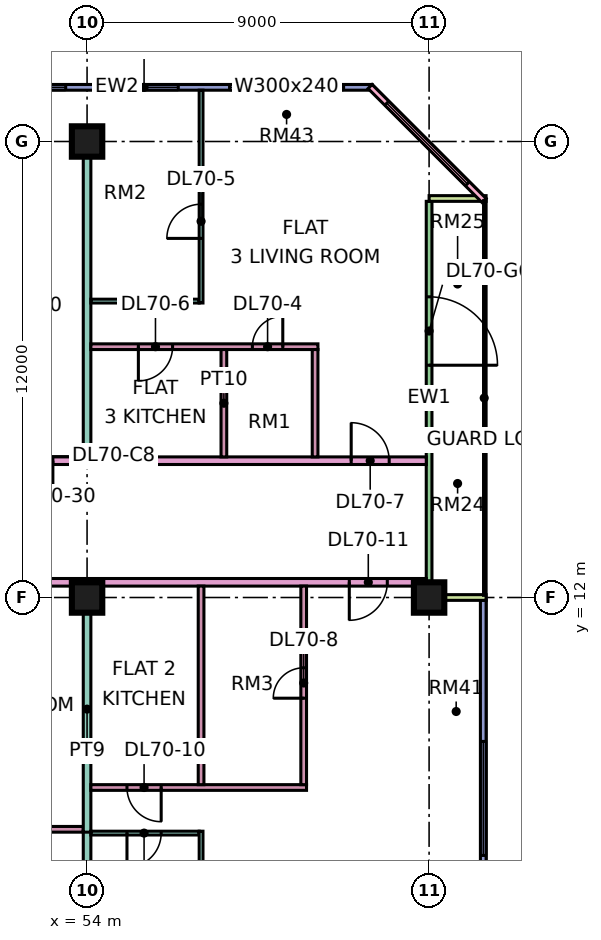
"""IFC4 building model, lengths in metres.
Left out: names, types, materials, properties, quantities, classifications, styles, units other than length and angle.
Written with IfcOpenShell. Run it as: python <this file> out.ifc"""

import sys

from ifc_helpers import new_model, si_unit, direction, frame, frame_2d, origin, origin_2d, place, context, subcontext, project, spatial, rectangle, extrude, element, fill, save


model = new_model("IFC4")
c1 = context("Model", 3, precision=1e-05, world=origin(), true_north=direction((0.0, 1.0)))
c2 = subcontext(c1, "Body", "Model", "MODEL_VIEW")
j1 = project(units=[si_unit("LENGTHUNIT", "METRE"), si_unit("PLANEANGLEUNIT", "RADIAN")], contexts=[c1])
p1 = place(None, origin())
s1 = spatial("IfcSite", under=j1, at=p1, CompositionType="ELEMENT")
p2 = place(p1, origin())
s2 = spatial("IfcBuilding", under=s1, at=p2, CompositionType="ELEMENT")
p3 = place(p2, frame((0.0, 0.0, 299.65)))
s3 = spatial("IfcBuildingStorey", under=s2, at=p3, CompositionType="ELEMENT", Elevation=299.65)
for number, where, z_axis, x_axis in (
    (1, (54.0, 12.0, 0.0), (0.0, 0.0, 1.0), (1.0, 0.0, 0.0)),
    (2, (54.0, 24.0, 0.0), (0.0, 0.0, 1.0), (1.0, 0.0, 0.0)),
    (3, (63.0, 12.0, 0.0), (0.0, 0.0, 1.0), (1.0, 0.0, 0.0)),
):
    element("IfcColumn", number, at=place(p3, frame(where, z_axis=z_axis, x_axis=x_axis)), inside=s3, PredefinedType="COLUMN", context=c2, shape_type="SweptSolid", body=[
        extrude(rectangle(XDim=0.8, YDim=0.8, at=origin_2d()), origin(), (0.0, 0.0, 1.0), 3.75),
    ])
p4 = place(p3, frame((61.5, 25.425, 0.0), z_axis=(0.0, 0.0, 1.0), x_axis=(-1.0, 0.0, 0.0)))
e4 = element("IfcWall", 4, at=p4, inside=s3, PredefinedType="SOLIDWALL", context=c2, shape_type="SweptSolid", body=[
    extrude(rectangle(XDim=13.425, YDim=0.15, at=frame_2d((6.712, 0.0))), origin(), (0.0, 0.0, 1.0), 3.35),
])
p5 = place(p4, frame((0.75, 0.0, 0.45)))
e5 = element("IfcOpeningElement", 5, at=p5, cuts=e4, PredefinedType="OPENING", context=c2, shape_type="SweptSolid", body=[
    extrude(rectangle(XDim=3.0, YDim=2.4, at=frame_2d((1.5, 1.2))), frame((0.0, 0.085, 0.0), z_axis=(0.0, -1.0, 0.0), x_axis=(1.0, 0.0, 0.0)), (0.0, 0.0, 1.0), 0.17),
])
p6 = place(p4, frame((5.1, 0.0, 0.45)))
e6 = element("IfcOpeningElement", 6, at=p6, cuts=e4, PredefinedType="OPENING", context=c2, shape_type="SweptSolid", body=[
    extrude(rectangle(XDim=1.8, YDim=2.4, at=frame_2d((0.9, 1.2))), frame((0.0, 0.085, 0.0), z_axis=(0.0, -1.0, 0.0), x_axis=(1.0, 0.0, 0.0)), (0.0, 0.0, 1.0), 0.17),
])
p7 = place(p4, frame((8.062, 0.0, 0.45)))
e7 = element("IfcOpeningElement", 7, at=p7, cuts=e4, PredefinedType="OPENING", context=c2, shape_type="SweptSolid", body=[
    extrude(rectangle(XDim=4.8, YDim=2.4, at=frame_2d((2.4, 1.2))), frame((0.0, 0.085, 0.0), z_axis=(0.0, -1.0, 0.0), x_axis=(1.0, 0.0, 0.0)), (0.0, 0.0, 1.0), 0.17),
])
p8 = place(p3, frame((64.425, 1.5, 0.0), z_axis=(0.0, 0.0, 1.0), x_axis=(0.0, 1.0, 0.0)))
e8 = element("IfcWall", 8, at=p8, inside=s3, PredefinedType="SOLIDWALL", context=c2, shape_type="SweptSolid", body=[
    extrude(rectangle(XDim=10.425, YDim=0.15, at=frame_2d((5.212, 0.0))), origin(), (0.0, 0.0, 1.0), 3.35),
])
p9 = place(p8, frame((3.712, 0.0, 0.45)))
e9 = element("IfcOpeningElement", 9, at=p9, cuts=e8, PredefinedType="OPENING", context=c2, shape_type="SweptSolid", body=[
    extrude(rectangle(XDim=3.0, YDim=2.4, at=frame_2d((1.5, 1.2))), frame((0.0, 0.085, 0.0), z_axis=(0.0, -1.0, 0.0), x_axis=(1.0, 0.0, 0.0)), (0.0, 0.0, 1.0), 0.17),
])
p10 = place(p3, frame((63.0, 12.075, 0.0), z_axis=(0.0, 0.0, 1.0), x_axis=(0.0, 1.0, 0.0)))
e10 = element("IfcWall", 10, at=p10, inside=s3, PredefinedType="SOLIDWALL", context=c2, shape_type="SweptSolid", body=[
    extrude(rectangle(XDim=10.35, YDim=0.15, at=frame_2d((5.175, 0.0))), origin(), (0.0, 0.0, 1.0), 3.35),
])
p11 = place(p10, frame((6.038, 0.0, 0.0)))
e11 = element("IfcOpeningElement", 11, at=p11, cuts=e10, PredefinedType="OPENING", context=c2, shape_type="SweptSolid", body=[
    extrude(rectangle(XDim=1.8, YDim=2.4, at=frame_2d((0.9, 1.2))), frame((0.0, 0.085, 0.0), z_axis=(0.0, -1.0, 0.0), x_axis=(1.0, 0.0, 0.0)), (0.0, 0.0, 1.0), 0.17),
])
for number, where, z_axis, x_axis in (
    (12, (64.5, 12.0, 0.0), (0.0, 0.0, 1.0), (-1.0, 0.0, 0.0)),
    (13, (64.5, 22.5, 0.0), (0.0, 0.0, 1.0), (-1.0, 0.0, 0.0)),
):
    element("IfcWall", number, at=place(p3, frame(where, z_axis=z_axis, x_axis=x_axis)), inside=s3, PredefinedType="SOLIDWALL", context=c2, shape_type="SweptSolid", body=[
        extrude(rectangle(XDim=1.5, YDim=0.15, at=frame_2d((0.75, 0.0))), origin(), (0.0, 0.0, 1.0), 3.35),
    ])
p12 = place(p3, frame((64.447, 22.447, 0.0), z_axis=(0.0, 0.0, 1.0), x_axis=(-0.707106781187, 0.707106781187, 0.0)))
e14 = element("IfcWall", 14, at=p12, inside=s3, PredefinedType="SOLIDWALL", context=c2, shape_type="SweptSolid", body=[
    extrude(rectangle(XDim=4.243, YDim=0.15, at=frame_2d((2.121, 0.0))), origin(), (0.0, 0.0, 1.0), 3.35),
])
p13 = place(p12, frame((0.621, 0.0, 0.45)))
e15 = element("IfcOpeningElement", 15, at=p13, cuts=e14, PredefinedType="OPENING", context=c2, shape_type="SweptSolid", body=[
    extrude(rectangle(XDim=3.0, YDim=2.4, at=frame_2d((1.5, 1.2))), frame((0.0, 0.085, 0.0), z_axis=(0.0, -1.0, 0.0), x_axis=(1.0, 0.0, 0.0)), (0.0, 0.0, 1.0), 0.17),
])
p14 = place(p3, frame((40.65, 12.4, 0.0), z_axis=(0.0, 0.0, 1.0), x_axis=(1.0, 0.0, 0.0)))
e16 = element("IfcWall", 16, at=p14, inside=s3, PredefinedType="PARTITIONING", context=c2, shape_type="SweptSolid", body=[
    extrude(rectangle(XDim=22.276, YDim=0.2, at=frame_2d((11.138, 0.0))), origin(), (0.0, 0.0, 1.0), 3.35),
])
p15 = place(p14, frame((20.25, 0.0, 0.0)))
e17 = element("IfcOpeningElement", 17, at=p15, cuts=e16, PredefinedType="OPENING", context=c2, shape_type="SweptSolid", body=[
    extrude(rectangle(XDim=1.0, YDim=2.1, at=frame_2d((0.5, 1.05))), frame((0.0, 0.11, 0.0), z_axis=(0.0, -1.0, 0.0), x_axis=(1.0, 0.0, 0.0)), (0.0, 0.0, 1.0), 0.22),
])
p16 = place(p14, frame((1.05, 0.0, 0.0)))
e18 = element("IfcOpeningElement", 18, at=p16, cuts=e16, PredefinedType="OPENING", context=c2, shape_type="SweptSolid", body=[
    extrude(rectangle(XDim=1.0, YDim=2.1, at=frame_2d((0.5, 1.05))), frame((0.0, 0.11, 0.0), z_axis=(0.0, -1.0, 0.0), x_axis=(1.0, 0.0, 0.0)), (0.0, 0.0, 1.0), 0.22),
])
p17 = place(p3, frame((43.575, 5.9, 0.0), z_axis=(0.0, 0.0, 1.0), x_axis=(1.0, 0.0, 0.0)))
e19 = element("IfcWall", 19, at=p17, inside=s3, PredefinedType="PARTITIONING", context=c2, shape_type="SweptSolid", body=[
    extrude(rectangle(XDim=10.325, YDim=0.15, at=frame_2d((5.163, 0.0))), origin(), (0.0, 0.0, 1.0), 3.35),
])
p18 = place(p17, frame((1.825, 0.0, 0.0)))
e20 = element("IfcOpeningElement", 20, at=p18, cuts=e19, PredefinedType="OPENING", context=c2, shape_type="SweptSolid", body=[
    extrude(rectangle(XDim=0.8, YDim=2.1, at=frame_2d((0.4, 1.05))), frame((0.0, 0.085, 0.0), z_axis=(0.0, -1.0, 0.0), x_axis=(1.0, 0.0, 0.0)), (0.0, 0.0, 1.0), 0.17),
])
p19 = place(p17, frame((6.975, 0.0, 0.0)))
e21 = element("IfcOpeningElement", 21, at=p19, cuts=e19, PredefinedType="OPENING", context=c2, shape_type="SweptSolid", body=[
    extrude(rectangle(XDim=0.9, YDim=2.1, at=frame_2d((0.45, 1.05))), frame((0.0, 0.085, 0.0), z_axis=(0.0, -1.0, 0.0), x_axis=(1.0, 0.0, 0.0)), (0.0, 0.0, 1.0), 0.17),
])
p20 = place(p3, frame((51.225, 15.6, 0.0), z_axis=(0.0, 0.0, 1.0), x_axis=(1.0, 0.0, 0.0)))
e22 = element("IfcWall", 22, at=p20, inside=s3, PredefinedType="PARTITIONING", context=c2, shape_type="SweptSolid", body=[
    extrude(rectangle(XDim=11.701, YDim=0.2, at=frame_2d((5.851, 0.0))), origin(), (0.0, 0.0, 1.0), 3.35),
])
p21 = place(p20, frame((9.725, 0.0, 0.0)))
e23 = element("IfcOpeningElement", 23, at=p21, cuts=e22, PredefinedType="OPENING", context=c2, shape_type="SweptSolid", body=[
    extrude(rectangle(XDim=1.0, YDim=2.1, at=frame_2d((0.5, 1.05))), frame((0.0, 0.11, 0.0), z_axis=(0.0, -1.0, 0.0), x_axis=(1.0, 0.0, 0.0)), (0.0, 0.0, 1.0), 0.22),
])
p22 = place(p20, frame((0.875, 0.0, 0.0)))
e24 = element("IfcOpeningElement", 24, at=p22, cuts=e22, PredefinedType="OPENING", context=c2, shape_type="SweptSolid", body=[
    extrude(rectangle(XDim=1.0, YDim=2.1, at=frame_2d((0.5, 1.05))), frame((0.0, 0.11, 0.0), z_axis=(0.0, -1.0, 0.0), x_axis=(1.0, 0.0, 0.0)), (0.0, 0.0, 1.0), 0.22),
])
p23 = place(p3, frame((54.0, 0.0, 0.0), z_axis=(0.0, 0.0, 1.0), x_axis=(0.0, 1.0, 0.0)))
e25 = element("IfcWall", 25, at=p23, inside=s3, PredefinedType="PARTITIONING", context=c2, shape_type="SweptSolid", body=[
    extrude(rectangle(XDim=5.85, YDim=0.2, at=frame_2d((2.925, 0.0))), origin(), (0.0, 0.0, 1.0), 3.35),
])
p24 = place(p3, frame((54.0, 5.825, 0.0), z_axis=(0.0, 0.0, 1.0), x_axis=(0.0, 1.0, 0.0)))
e26 = element("IfcWall", 26, at=p24, inside=s3, PredefinedType="PARTITIONING", context=c2, shape_type="SweptSolid", body=[
    extrude(rectangle(XDim=6.475, YDim=0.2, at=frame_2d((3.238, 0.0))), origin(), (0.0, 0.0, 1.0), 3.35),
])
p25 = place(p3, frame((54.0, 15.7, 0.0), z_axis=(0.0, 0.0, 1.0), x_axis=(0.0, 1.0, 0.0)))
e27 = element("IfcWall", 27, at=p25, inside=s3, PredefinedType="PARTITIONING", context=c2, shape_type="SweptSolid", body=[
    extrude(rectangle(XDim=8.3, YDim=0.2, at=frame_2d((4.15, 0.0))), origin(), (0.0, 0.0, 1.0), 3.35),
])
p26 = place(p3, frame((54.1, 5.8, 0.0), z_axis=(0.0, 0.0, 1.0), x_axis=(1.0, 0.0, 0.0)))
e28 = element("IfcWall", 28, at=p26, inside=s3, PredefinedType="PARTITIONING", context=c2, shape_type="SweptSolid", body=[
    extrude(rectangle(XDim=2.85, YDim=0.1, at=frame_2d((1.425, 0.0))), origin(), (0.0, 0.0, 1.0), 3.35),
])
p27 = place(p26, frame((0.95, 0.0, 0.0)))
e29 = element("IfcOpeningElement", 29, at=p27, cuts=e28, PredefinedType="OPENING", context=c2, shape_type="SweptSolid", body=[
    extrude(rectangle(XDim=0.9, YDim=2.1, at=frame_2d((0.45, 1.05))), frame((0.0, 0.06, 0.0), z_axis=(0.0, -1.0, 0.0), x_axis=(1.0, 0.0, 0.0)), (0.0, 0.0, 1.0), 0.12),
])
p28 = place(p3, frame((54.1, 7.0, 0.0), z_axis=(0.0, 0.0, 1.0), x_axis=(1.0, 0.0, 0.0)))
e30 = element("IfcWall", 30, at=p28, inside=s3, PredefinedType="PARTITIONING", context=c2, shape_type="SweptSolid", body=[
    extrude(rectangle(XDim=5.675, YDim=0.15, at=frame_2d((2.837, 0.0))), origin(), (0.0, 0.0, 1.0), 3.35),
])
p29 = place(p28, frame((0.95, 0.0, 0.0)))
e31 = element("IfcOpeningElement", 31, at=p29, cuts=e30, PredefinedType="OPENING", context=c2, shape_type="SweptSolid", body=[
    extrude(rectangle(XDim=0.9, YDim=2.1, at=frame_2d((0.45, 1.05))), frame((0.0, 0.085, 0.0), z_axis=(0.0, -1.0, 0.0), x_axis=(1.0, 0.0, 0.0)), (0.0, 0.0, 1.0), 0.17),
])
p30 = place(p3, frame((54.1, 18.6, 0.0), z_axis=(0.0, 0.0, 1.0), x_axis=(1.0, 0.0, 0.0)))
e32 = element("IfcWall", 32, at=p30, inside=s3, PredefinedType="PARTITIONING", context=c2, shape_type="SweptSolid", body=[
    extrude(rectangle(XDim=5.975, YDim=0.15, at=frame_2d((2.987, 0.0))), origin(), (0.0, 0.0, 1.0), 3.35),
])
p31 = place(p30, frame((4.25, 0.0, 0.0)))
e33 = element("IfcOpeningElement", 33, at=p31, cuts=e32, PredefinedType="OPENING", context=c2, shape_type="SweptSolid", body=[
    extrude(rectangle(XDim=0.8, YDim=2.1, at=frame_2d((0.4, 1.05))), frame((0.0, 0.085, 0.0), z_axis=(0.0, -1.0, 0.0), x_axis=(1.0, 0.0, 0.0)), (0.0, 0.0, 1.0), 0.17),
])
p32 = place(p30, frame((1.25, 0.0, 0.0)))
e34 = element("IfcOpeningElement", 34, at=p32, cuts=e32, PredefinedType="OPENING", context=c2, shape_type="SweptSolid", body=[
    extrude(rectangle(XDim=0.9, YDim=2.1, at=frame_2d((0.45, 1.05))), frame((0.0, 0.085, 0.0), z_axis=(0.0, -1.0, 0.0), x_axis=(1.0, 0.0, 0.0)), (0.0, 0.0, 1.0), 0.17),
])
p33 = place(p3, frame((54.1, 19.8, 0.0), z_axis=(0.0, 0.0, 1.0), x_axis=(1.0, 0.0, 0.0)))
e35 = element("IfcWall", 35, at=p33, inside=s3, PredefinedType="PARTITIONING", context=c2, shape_type="SweptSolid", body=[
    extrude(rectangle(XDim=2.85, YDim=0.1, at=frame_2d((1.425, 0.0))), origin(), (0.0, 0.0, 1.0), 3.35),
])
p34 = place(p3, frame((57.0, -1.35, 0.0), z_axis=(0.0, 0.0, 1.0), x_axis=(0.0, 1.0, 0.0)))
e36 = element("IfcWall", 36, at=p34, inside=s3, PredefinedType="PARTITIONING", context=c2, shape_type="SweptSolid", body=[
    extrude(rectangle(XDim=7.2, YDim=0.1, at=frame_2d((3.6, 0.0))), origin(), (0.0, 0.0, 1.0), 3.35),
])
p35 = place(p3, frame((57.0, 7.075, 0.0), z_axis=(0.0, 0.0, 1.0), x_axis=(0.0, 1.0, 0.0)))
e37 = element("IfcWall", 37, at=p35, inside=s3, PredefinedType="PARTITIONING", context=c2, shape_type="SweptSolid", body=[
    extrude(rectangle(XDim=5.225, YDim=0.15, at=frame_2d((2.613, 0.0))), origin(), (0.0, 0.0, 1.0), 3.35),
])
p36 = place(p3, frame((57.0, 19.75, 0.0), z_axis=(0.0, 0.0, 1.0), x_axis=(0.0, 1.0, 0.0)))
e38 = element("IfcWall", 38, at=p36, inside=s3, PredefinedType="PARTITIONING", context=c2, shape_type="SweptSolid", body=[
    extrude(rectangle(XDim=5.6, YDim=0.1, at=frame_2d((2.8, 0.0))), origin(), (0.0, 0.0, 1.0), 3.35),
])
p37 = place(p36, frame((1.7, 0.0, 0.0)))
e39 = element("IfcOpeningElement", 39, at=p37, cuts=e38, PredefinedType="OPENING", context=c2, shape_type="SweptSolid", body=[
    extrude(rectangle(XDim=0.9, YDim=2.1, at=frame_2d((0.45, 1.05))), frame((0.0, 0.06, 0.0), z_axis=(0.0, -1.0, 0.0), x_axis=(1.0, 0.0, 0.0)), (0.0, 0.0, 1.0), 0.12),
])
p38 = place(p3, frame((57.6, 15.7, 0.0), z_axis=(0.0, 0.0, 1.0), x_axis=(0.0, 1.0, 0.0)))
e40 = element("IfcWall", 40, at=p38, inside=s3, PredefinedType="PARTITIONING", context=c2, shape_type="SweptSolid", body=[
    extrude(rectangle(XDim=2.825, YDim=0.15, at=frame_2d((1.413, 0.0))), origin(), (0.0, 0.0, 1.0), 3.35),
])
p39 = place(p3, frame((59.7, 7.075, 0.0), z_axis=(0.0, 0.0, 1.0), x_axis=(0.0, 1.0, 0.0)))
e41 = element("IfcWall", 41, at=p39, inside=s3, PredefinedType="PARTITIONING", context=c2, shape_type="SweptSolid", body=[
    extrude(rectangle(XDim=5.225, YDim=0.15, at=frame_2d((2.613, 0.0))), origin(), (0.0, 0.0, 1.0), 3.35),
])
p40 = place(p39, frame((2.275, 0.0, 0.0)))
e42 = element("IfcOpeningElement", 42, at=p40, cuts=e41, PredefinedType="OPENING", context=c2, shape_type="SweptSolid", body=[
    extrude(rectangle(XDim=0.8, YDim=2.1, at=frame_2d((0.4, 1.05))), frame((0.0, 0.085, 0.0), z_axis=(0.0, -1.0, 0.0), x_axis=(1.0, 0.0, 0.0)), (0.0, 0.0, 1.0), 0.17),
])
p41 = place(p3, frame((60.0, 15.7, 0.0), z_axis=(0.0, 0.0, 1.0), x_axis=(0.0, 1.0, 0.0)))
e43 = element("IfcWall", 43, at=p41, inside=s3, PredefinedType="PARTITIONING", context=c2, shape_type="SweptSolid", body=[
    extrude(rectangle(XDim=2.825, YDim=0.15, at=frame_2d((1.413, 0.0))), origin(), (0.0, 0.0, 1.0), 3.35),
])
p42 = place(p5, origin())
e44 = element("IfcWindow", 44, at=p42, inside=s3, PartitioningType="SINGLE_PANEL", PredefinedType="WINDOW", context=c2, shape_type="SweptSolid", body=[
    extrude(rectangle(XDim=3.0, YDim=2.4, at=frame_2d((1.5, 1.2))), frame((0.0, 0.03, 0.0), z_axis=(0.0, -1.0, 0.0), x_axis=(1.0, 0.0, 0.0)), (0.0, 0.0, 1.0), 0.06),
])
fill(e5, e44)
p43 = place(p6, origin())
e45 = element("IfcWindow", 45, at=p43, inside=s3, PartitioningType="SINGLE_PANEL", PredefinedType="WINDOW", context=c2, shape_type="SweptSolid", body=[
    extrude(rectangle(XDim=1.8, YDim=2.4, at=frame_2d((0.9, 1.2))), frame((0.0, 0.03, 0.0), z_axis=(0.0, -1.0, 0.0), x_axis=(1.0, 0.0, 0.0)), (0.0, 0.0, 1.0), 0.06),
])
fill(e6, e45)
p44 = place(p7, origin())
e46 = element("IfcWindow", 46, at=p44, inside=s3, PartitioningType="SINGLE_PANEL", PredefinedType="WINDOW", context=c2, shape_type="SweptSolid", body=[
    extrude(rectangle(XDim=4.8, YDim=2.4, at=frame_2d((2.4, 1.2))), frame((0.0, 0.03, 0.0), z_axis=(0.0, -1.0, 0.0), x_axis=(1.0, 0.0, 0.0)), (0.0, 0.0, 1.0), 0.06),
])
fill(e7, e46)
p45 = place(p9, origin())
e47 = element("IfcWindow", 47, at=p45, inside=s3, PartitioningType="SINGLE_PANEL", PredefinedType="WINDOW", context=c2, shape_type="SweptSolid", body=[
    extrude(rectangle(XDim=3.0, YDim=2.4, at=frame_2d((1.5, 1.2))), frame((0.0, 0.03, 0.0), z_axis=(0.0, -1.0, 0.0), x_axis=(1.0, 0.0, 0.0)), (0.0, 0.0, 1.0), 0.06),
])
fill(e9, e47)
p46 = place(p11, frame((1.8, 0.0, 0.0), z_axis=(0.0, 0.0, 1.0), x_axis=(-1.0, 0.0, 0.0)))
e48 = element("IfcDoor", 48, at=p46, inside=s3, OperationType="DOUBLE_DOOR_SINGLE_SWING", PredefinedType="DOOR", context=c2, shape_type="SweptSolid", body=[
    extrude(rectangle(XDim=1.8, YDim=2.4, at=frame_2d((0.9, 1.2))), frame((0.0, 0.025, 0.0), z_axis=(0.0, -1.0, 0.0), x_axis=(1.0, 0.0, 0.0)), (0.0, 0.0, 1.0), 0.05),
])
fill(e11, e48)
p47 = place(p13, origin())
e49 = element("IfcWindow", 49, at=p47, inside=s3, PartitioningType="SINGLE_PANEL", PredefinedType="WINDOW", context=c2, shape_type="SweptSolid", body=[
    extrude(rectangle(XDim=3.0, YDim=2.4, at=frame_2d((1.5, 1.2))), frame((0.0, 0.03, 0.0), z_axis=(0.0, -1.0, 0.0), x_axis=(1.0, 0.0, 0.0)), (0.0, 0.0, 1.0), 0.06),
])
fill(e15, e49)
p48 = place(p31, frame((0.8, 0.0, 0.0), z_axis=(0.0, 0.0, 1.0), x_axis=(-1.0, 0.0, 0.0)))
e50 = element("IfcDoor", 50, at=p48, inside=s3, OperationType="SINGLE_SWING_RIGHT", PredefinedType="DOOR", context=c2, shape_type="SweptSolid", body=[
    extrude(rectangle(XDim=0.8, YDim=2.1, at=frame_2d((0.4, 1.05))), frame((0.0, 0.025, 0.0), z_axis=(0.0, -1.0, 0.0), x_axis=(1.0, 0.0, 0.0)), (0.0, 0.0, 1.0), 0.05),
])
fill(e33, e50)
p49 = place(p37, origin())
e51 = element("IfcDoor", 51, at=p49, inside=s3, OperationType="SINGLE_SWING_LEFT", PredefinedType="DOOR", context=c2, shape_type="SweptSolid", body=[
    extrude(rectangle(XDim=0.9, YDim=2.1, at=frame_2d((0.45, 1.05))), frame((0.0, 0.025, 0.0), z_axis=(0.0, -1.0, 0.0), x_axis=(1.0, 0.0, 0.0)), (0.0, 0.0, 1.0), 0.05),
])
fill(e39, e51)
p50 = place(p32, frame((0.9, 0.0, 0.0), z_axis=(0.0, 0.0, 1.0), x_axis=(-1.0, 0.0, 0.0)))
e52 = element("IfcDoor", 52, at=p50, inside=s3, OperationType="SINGLE_SWING_LEFT", PredefinedType="DOOR", context=c2, shape_type="SweptSolid", body=[
    extrude(rectangle(XDim=0.9, YDim=2.1, at=frame_2d((0.45, 1.05))), frame((0.0, 0.025, 0.0), z_axis=(0.0, -1.0, 0.0), x_axis=(1.0, 0.0, 0.0)), (0.0, 0.0, 1.0), 0.05),
])
fill(e34, e52)
p51 = place(p21, origin())
e53 = element("IfcDoor", 53, at=p51, inside=s3, OperationType="SINGLE_SWING_LEFT", PredefinedType="DOOR", context=c2, shape_type="SweptSolid", body=[
    extrude(rectangle(XDim=1.0, YDim=2.1, at=frame_2d((0.5, 1.05))), frame((0.0, 0.025, 0.0), z_axis=(0.0, -1.0, 0.0), x_axis=(1.0, 0.0, 0.0)), (0.0, 0.0, 1.0), 0.05),
])
fill(e23, e53)
p52 = place(p40, origin())
e54 = element("IfcDoor", 54, at=p52, inside=s3, OperationType="SINGLE_SWING_LEFT", PredefinedType="DOOR", context=c2, shape_type="SweptSolid", body=[
    extrude(rectangle(XDim=0.8, YDim=2.1, at=frame_2d((0.4, 1.05))), frame((0.0, 0.025, 0.0), z_axis=(0.0, -1.0, 0.0), x_axis=(1.0, 0.0, 0.0)), (0.0, 0.0, 1.0), 0.05),
])
fill(e42, e54)
p53 = place(p27, frame((0.9, 0.0, 0.0), z_axis=(0.0, 0.0, 1.0), x_axis=(-1.0, 0.0, 0.0)))
e55 = element("IfcDoor", 55, at=p53, inside=s3, OperationType="SINGLE_SWING_LEFT", PredefinedType="DOOR", context=c2, shape_type="SweptSolid", body=[
    extrude(rectangle(XDim=0.9, YDim=2.1, at=frame_2d((0.45, 1.05))), frame((0.0, 0.025, 0.0), z_axis=(0.0, -1.0, 0.0), x_axis=(1.0, 0.0, 0.0)), (0.0, 0.0, 1.0), 0.05),
])
fill(e29, e55)
p54 = place(p29, origin())
e56 = element("IfcDoor", 56, at=p54, inside=s3, OperationType="SINGLE_SWING_RIGHT", PredefinedType="DOOR", context=c2, shape_type="SweptSolid", body=[
    extrude(rectangle(XDim=0.9, YDim=2.1, at=frame_2d((0.45, 1.05))), frame((0.0, 0.025, 0.0), z_axis=(0.0, -1.0, 0.0), x_axis=(1.0, 0.0, 0.0)), (0.0, 0.0, 1.0), 0.05),
])
fill(e31, e56)
p55 = place(p15, frame((1.0, 0.0, 0.0), z_axis=(0.0, 0.0, 1.0), x_axis=(-1.0, 0.0, 0.0)))
e57 = element("IfcDoor", 57, at=p55, inside=s3, OperationType="SINGLE_SWING_LEFT", PredefinedType="DOOR", context=c2, shape_type="SweptSolid", body=[
    extrude(rectangle(XDim=1.0, YDim=2.1, at=frame_2d((0.5, 1.05))), frame((0.0, 0.025, 0.0), z_axis=(0.0, -1.0, 0.0), x_axis=(1.0, 0.0, 0.0)), (0.0, 0.0, 1.0), 0.05),
])
fill(e17, e57)
p56 = place(p22, origin())
e58 = element("IfcDoor", 58, at=p56, inside=s3, OperationType="SINGLE_SWING_RIGHT", PredefinedType="DOOR", context=c2, shape_type="SweptSolid", body=[
    extrude(rectangle(XDim=1.0, YDim=2.1, at=frame_2d((0.5, 1.05))), frame((0.0, 0.025, 0.0), z_axis=(0.0, -1.0, 0.0), x_axis=(1.0, 0.0, 0.0)), (0.0, 0.0, 1.0), 0.05),
])
fill(e24, e58)
save(model, sys.argv[1])
